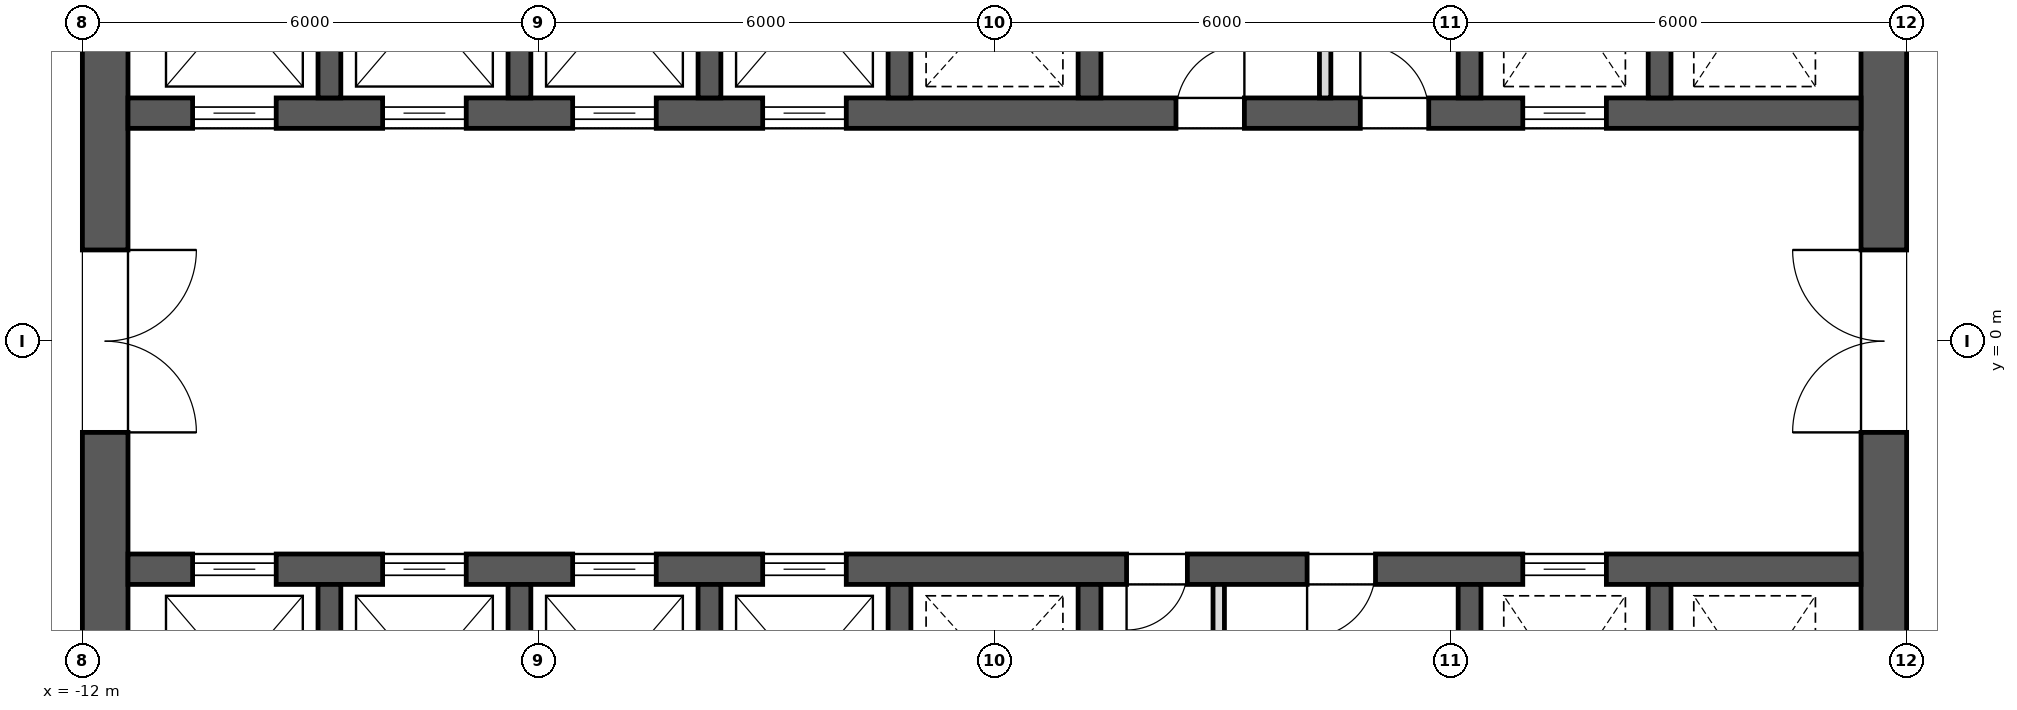
"""IFC4 building model, lengths in metres.
Left out: names, types, materials, properties, quantities, classifications, styles, units other than length and angle.
Written with IfcOpenShell. Run it as: python <this file> out.ifc"""

import sys

from ifc_helpers import new_model, si_unit, direction, frame, frame_2d, origin, place, context, subcontext, project, spatial, rectangle, extrude, element, fill, save


model = new_model("IFC4")
c1 = context("Model", 3, precision=1e-05, world=origin(), true_north=direction((0.0, 1.0)))
c2 = subcontext(c1, "Body", "Model", "MODEL_VIEW")
j1 = project(units=[si_unit("LENGTHUNIT", "METRE"), si_unit("PLANEANGLEUNIT", "RADIAN")], contexts=[c1])
p1 = place(None, origin())
s1 = spatial("IfcSite", under=j1, at=p1, CompositionType="ELEMENT")
p2 = place(p1, origin())
s2 = spatial("IfcBuilding", under=s1, at=p2, CompositionType="ELEMENT")
p3 = place(p2, frame((0.0, 0.0, 190.9)))
s3 = spatial("IfcBuildingStorey", under=s2, at=p3, CompositionType="ELEMENT", Elevation=190.9)
p4 = place(p3, frame((11.7, -11.4, 0.0), z_axis=(0.0, 0.0, 1.0), x_axis=(0.0, 1.0, 0.0)))
e1 = element("IfcWall", 1, at=p4, inside=s3, PredefinedType="SHEAR", context=c2, shape_type="SweptSolid", body=[
    extrude(rectangle(XDim=22.8, YDim=0.6, at=frame_2d((11.4, 0.0))), origin(), (0.0, 0.0, 1.0), 4.0),
])
p5 = place(p4, frame((10.2, 0.0, 0.0)))
e2 = element("IfcOpeningElement", 2, at=p5, cuts=e1, PredefinedType="OPENING", context=c2, shape_type="SweptSolid", body=[
    extrude(rectangle(XDim=2.4, YDim=2.1, at=frame_2d((1.2, 1.05))), frame((0.0, 0.312, 0.0), z_axis=(0.0, -1.0, 0.0), x_axis=(1.0, 0.0, 0.0)), (0.0, 0.0, 1.0), 0.624),
])
p6 = place(p4, frame((19.5, 0.0, 0.0)))
e3 = element("IfcOpeningElement", 3, at=p6, cuts=e1, PredefinedType="OPENING", context=c2, shape_type="SweptSolid", body=[
    extrude(rectangle(XDim=1.2, YDim=2.1, at=frame_2d((0.6, 1.05))), frame((0.0, 0.312, 0.0), z_axis=(0.0, -1.0, 0.0), x_axis=(1.0, 0.0, 0.0)), (0.0, 0.0, 1.0), 0.624),
])
p7 = place(p4, frame((2.1, 0.0, 0.0)))
e4 = element("IfcOpeningElement", 4, at=p7, cuts=e1, PredefinedType="OPENING", context=c2, shape_type="SweptSolid", body=[
    extrude(rectangle(XDim=1.2, YDim=2.1, at=frame_2d((0.6, 1.05))), frame((0.0, 0.312, 0.0), z_axis=(0.0, -1.0, 0.0), x_axis=(1.0, 0.0, 0.0)), (0.0, 0.0, 1.0), 0.624),
])
p8 = place(p3, frame((-11.7, -11.4, 0.0), z_axis=(0.0, 0.0, 1.0), x_axis=(0.0, 1.0, 0.0)))
e5 = element("IfcWall", 5, at=p8, inside=s3, PredefinedType="SHEAR", context=c2, shape_type="SweptSolid", body=[
    extrude(rectangle(XDim=22.8, YDim=0.6, at=frame_2d((11.4, 0.0))), origin(), (0.0, 0.0, 1.0), 4.0),
])
p9 = place(p8, frame((10.2, 0.0, 0.0)))
e6 = element("IfcOpeningElement", 6, at=p9, cuts=e5, PredefinedType="OPENING", context=c2, shape_type="SweptSolid", body=[
    extrude(rectangle(XDim=2.4, YDim=2.1, at=frame_2d((1.2, 1.05))), frame((0.0, 0.312, 0.0), z_axis=(0.0, -1.0, 0.0), x_axis=(1.0, 0.0, 0.0)), (0.0, 0.0, 1.0), 0.624),
])
p10 = place(p8, frame((18.925, 0.0, 0.0)))
e7 = element("IfcOpeningElement", 7, at=p10, cuts=e5, PredefinedType="OPENING", context=c2, shape_type="SweptSolid", body=[
    extrude(rectangle(XDim=1.2, YDim=2.1, at=frame_2d((0.6, 1.05))), frame((0.0, 0.312, 0.0), z_axis=(0.0, -1.0, 0.0), x_axis=(1.0, 0.0, 0.0)), (0.0, 0.0, 1.0), 0.624),
])
p11 = place(p8, frame((2.675, 0.0, 0.0)))
e8 = element("IfcOpeningElement", 8, at=p11, cuts=e5, PredefinedType="OPENING", context=c2, shape_type="SweptSolid", body=[
    extrude(rectangle(XDim=1.2, YDim=2.1, at=frame_2d((0.6, 1.05))), frame((0.0, 0.312, 0.0), z_axis=(0.0, -1.0, 0.0), x_axis=(1.0, 0.0, 0.0)), (0.0, 0.0, 1.0), 0.624),
])
p12 = place(p3, frame((-11.4, 3.0, 0.0), z_axis=(0.0, 0.0, 1.0), x_axis=(1.0, 0.0, 0.0)))
e9 = element("IfcWall", 9, at=p12, inside=s3, PredefinedType="SHEAR", context=c2, shape_type="SweptSolid", body=[
    extrude(rectangle(XDim=22.8, YDim=0.4, at=frame_2d((11.4, 0.0))), origin(), (0.0, 0.0, 1.0), 4.0),
])
p13 = place(p12, frame((0.85, 0.0, 0.0)))
e10 = element("IfcOpeningElement", 10, at=p13, cuts=e9, PredefinedType="OPENING", context=c2, shape_type="SweptSolid", body=[
    extrude(rectangle(XDim=1.1, YDim=2.1, at=frame_2d((0.55, 1.05))), frame((0.0, 0.212, 0.0), z_axis=(0.0, -1.0, 0.0), x_axis=(1.0, 0.0, 0.0)), (0.0, 0.0, 1.0), 0.424),
])
p14 = place(p12, frame((3.35, 0.0, 0.0)))
e11 = element("IfcOpeningElement", 11, at=p14, cuts=e9, PredefinedType="OPENING", context=c2, shape_type="SweptSolid", body=[
    extrude(rectangle(XDim=1.1, YDim=2.1, at=frame_2d((0.55, 1.05))), frame((0.0, 0.212, 0.0), z_axis=(0.0, -1.0, 0.0), x_axis=(1.0, 0.0, 0.0)), (0.0, 0.0, 1.0), 0.424),
])
p15 = place(p12, frame((5.85, 0.0, 0.0)))
e12 = element("IfcOpeningElement", 12, at=p15, cuts=e9, PredefinedType="OPENING", context=c2, shape_type="SweptSolid", body=[
    extrude(rectangle(XDim=1.1, YDim=2.1, at=frame_2d((0.55, 1.05))), frame((0.0, 0.212, 0.0), z_axis=(0.0, -1.0, 0.0), x_axis=(1.0, 0.0, 0.0)), (0.0, 0.0, 1.0), 0.424),
])
p16 = place(p12, frame((8.35, 0.0, 0.0)))
e13 = element("IfcOpeningElement", 13, at=p16, cuts=e9, PredefinedType="OPENING", context=c2, shape_type="SweptSolid", body=[
    extrude(rectangle(XDim=1.1, YDim=2.1, at=frame_2d((0.55, 1.05))), frame((0.0, 0.212, 0.0), z_axis=(0.0, -1.0, 0.0), x_axis=(1.0, 0.0, 0.0)), (0.0, 0.0, 1.0), 0.424),
])
p17 = place(p12, frame((18.35, 0.0, 0.0)))
e14 = element("IfcOpeningElement", 14, at=p17, cuts=e9, PredefinedType="OPENING", context=c2, shape_type="SweptSolid", body=[
    extrude(rectangle(XDim=1.1, YDim=2.1, at=frame_2d((0.55, 1.05))), frame((0.0, 0.212, 0.0), z_axis=(0.0, -1.0, 0.0), x_axis=(1.0, 0.0, 0.0)), (0.0, 0.0, 1.0), 0.424),
])
p18 = place(p12, frame((13.788, 0.0, 0.0)))
e15 = element("IfcOpeningElement", 15, at=p18, cuts=e9, PredefinedType="OPENING", context=c2, shape_type="SweptSolid", body=[
    extrude(rectangle(XDim=0.9, YDim=2.1, at=frame_2d((0.45, 1.05))), frame((0.0, 0.212, 0.0), z_axis=(0.0, -1.0, 0.0), x_axis=(1.0, 0.0, 0.0)), (0.0, 0.0, 1.0), 0.424),
])
p19 = place(p12, frame((16.212, 0.0, 0.0)))
e16 = element("IfcOpeningElement", 16, at=p19, cuts=e9, PredefinedType="OPENING", context=c2, shape_type="SweptSolid", body=[
    extrude(rectangle(XDim=0.9, YDim=2.1, at=frame_2d((0.45, 1.05))), frame((0.0, 0.212, 0.0), z_axis=(0.0, -1.0, 0.0), x_axis=(1.0, 0.0, 0.0)), (0.0, 0.0, 1.0), 0.424),
])
for number, where, z_axis, x_axis in (
    (17, (-8.75, 3.2, 0.0), (0.0, 0.0, 1.0), (0.0, 1.0, 0.0)),
    (18, (-6.25, 3.2, 0.0), (0.0, 0.0, 1.0), (0.0, 1.0, 0.0)),
    (19, (-3.75, 3.2, 0.0), (0.0, 0.0, 1.0), (0.0, 1.0, 0.0)),
    (20, (-1.25, 3.2, 0.0), (0.0, 0.0, 1.0), (0.0, 1.0, 0.0)),
    (21, (1.25, 3.2, 0.0), (0.0, 0.0, 1.0), (0.0, 1.0, 0.0)),
    (22, (6.25, 3.2, 0.0), (0.0, 0.0, 1.0), (0.0, 1.0, 0.0)),
    (23, (8.75, 3.2, 0.0), (0.0, 0.0, 1.0), (0.0, 1.0, 0.0)),
):
    element("IfcWall", number, at=place(p3, frame(where, z_axis=z_axis, x_axis=x_axis)), inside=s3, PredefinedType="SHEAR", context=c2, shape_type="SweptSolid", body=[
        extrude(rectangle(XDim=2.9, YDim=0.3, at=frame_2d((1.45, 0.0))), origin(), (0.0, 0.0, 1.0), 4.0),
    ])
p20 = place(p3, frame((-11.4, -3.0, 0.0), z_axis=(0.0, 0.0, 1.0), x_axis=(1.0, 0.0, 0.0)))
e24 = element("IfcWall", 24, at=p20, inside=s3, PredefinedType="SHEAR", context=c2, shape_type="SweptSolid", body=[
    extrude(rectangle(XDim=22.8, YDim=0.4, at=frame_2d((11.4, 0.0))), origin(), (0.0, 0.0, 1.0), 4.0),
])
p21 = place(p20, frame((0.85, 0.0, 0.0)))
e25 = element("IfcOpeningElement", 25, at=p21, cuts=e24, PredefinedType="OPENING", context=c2, shape_type="SweptSolid", body=[
    extrude(rectangle(XDim=1.1, YDim=2.1, at=frame_2d((0.55, 1.05))), frame((0.0, 0.212, 0.0), z_axis=(0.0, -1.0, 0.0), x_axis=(1.0, 0.0, 0.0)), (0.0, 0.0, 1.0), 0.424),
])
p22 = place(p20, frame((3.35, 0.0, 0.0)))
e26 = element("IfcOpeningElement", 26, at=p22, cuts=e24, PredefinedType="OPENING", context=c2, shape_type="SweptSolid", body=[
    extrude(rectangle(XDim=1.1, YDim=2.1, at=frame_2d((0.55, 1.05))), frame((0.0, 0.212, 0.0), z_axis=(0.0, -1.0, 0.0), x_axis=(1.0, 0.0, 0.0)), (0.0, 0.0, 1.0), 0.424),
])
p23 = place(p20, frame((5.85, 0.0, 0.0)))
e27 = element("IfcOpeningElement", 27, at=p23, cuts=e24, PredefinedType="OPENING", context=c2, shape_type="SweptSolid", body=[
    extrude(rectangle(XDim=1.1, YDim=2.1, at=frame_2d((0.55, 1.05))), frame((0.0, 0.212, 0.0), z_axis=(0.0, -1.0, 0.0), x_axis=(1.0, 0.0, 0.0)), (0.0, 0.0, 1.0), 0.424),
])
p24 = place(p20, frame((8.35, 0.0, 0.0)))
e28 = element("IfcOpeningElement", 28, at=p24, cuts=e24, PredefinedType="OPENING", context=c2, shape_type="SweptSolid", body=[
    extrude(rectangle(XDim=1.1, YDim=2.1, at=frame_2d((0.55, 1.05))), frame((0.0, 0.212, 0.0), z_axis=(0.0, -1.0, 0.0), x_axis=(1.0, 0.0, 0.0)), (0.0, 0.0, 1.0), 0.424),
])
p25 = place(p20, frame((18.35, 0.0, 0.0)))
e29 = element("IfcOpeningElement", 29, at=p25, cuts=e24, PredefinedType="OPENING", context=c2, shape_type="SweptSolid", body=[
    extrude(rectangle(XDim=1.1, YDim=2.1, at=frame_2d((0.55, 1.05))), frame((0.0, 0.212, 0.0), z_axis=(0.0, -1.0, 0.0), x_axis=(1.0, 0.0, 0.0)), (0.0, 0.0, 1.0), 0.424),
])
p26 = place(p20, frame((13.137, 0.0, 0.0)))
e30 = element("IfcOpeningElement", 30, at=p26, cuts=e24, PredefinedType="OPENING", context=c2, shape_type="SweptSolid", body=[
    extrude(rectangle(XDim=0.8, YDim=2.1, at=frame_2d((0.4, 1.05))), frame((0.0, 0.212, 0.0), z_axis=(0.0, -1.0, 0.0), x_axis=(1.0, 0.0, 0.0)), (0.0, 0.0, 1.0), 0.424),
])
p27 = place(p20, frame((15.512, 0.0, 0.0)))
e31 = element("IfcOpeningElement", 31, at=p27, cuts=e24, PredefinedType="OPENING", context=c2, shape_type="SweptSolid", body=[
    extrude(rectangle(XDim=0.9, YDim=2.1, at=frame_2d((0.45, 1.05))), frame((0.0, 0.212, 0.0), z_axis=(0.0, -1.0, 0.0), x_axis=(1.0, 0.0, 0.0)), (0.0, 0.0, 1.0), 0.424),
])
for number, where, z_axis, x_axis in (
    (32, (-8.75, -6.1, 0.0), (0.0, 0.0, 1.0), (0.0, 1.0, 0.0)),
    (33, (-6.25, -6.1, 0.0), (0.0, 0.0, 1.0), (0.0, 1.0, 0.0)),
    (34, (-3.75, -6.1, 0.0), (0.0, 0.0, 1.0), (0.0, 1.0, 0.0)),
    (35, (-1.25, -6.1, 0.0), (0.0, 0.0, 1.0), (0.0, 1.0, 0.0)),
    (36, (1.25, -6.1, 0.0), (0.0, 0.0, 1.0), (0.0, 1.0, 0.0)),
    (37, (6.25, -6.1, 0.0), (0.0, 0.0, 1.0), (0.0, 1.0, 0.0)),
    (38, (8.75, -6.1, 0.0), (0.0, 0.0, 1.0), (0.0, 1.0, 0.0)),
):
    element("IfcWall", number, at=place(p3, frame(where, z_axis=z_axis, x_axis=x_axis)), inside=s3, PredefinedType="SHEAR", context=c2, shape_type="SweptSolid", body=[
        extrude(rectangle(XDim=2.9, YDim=0.3, at=frame_2d((1.45, 0.0))), origin(), (0.0, 0.0, 1.0), 4.0),
    ])
for number, where, z_axis, x_axis in (
    (39, (4.35, 3.2, 0.0), (0.0, 0.0, 1.0), (0.0, 1.0, 0.0)),
    (40, (2.95, -6.1, 0.0), (0.0, 0.0, 1.0), (0.0, 1.0, 0.0)),
):
    element("IfcWall", number, at=place(p3, frame(where, z_axis=z_axis, x_axis=x_axis)), inside=s3, PredefinedType="PARTITIONING", context=c2, shape_type="SweptSolid", body=[
        extrude(rectangle(XDim=2.9, YDim=0.15, at=frame_2d((1.45, 0.0))), origin(), (0.0, 0.0, 1.0), 3.7),
    ])
p28 = place(p13, origin())
e41 = element("IfcDoor", 41, at=p28, inside=s3, OperationType="SLIDING_TO_LEFT", PredefinedType="DOOR", context=c2, shape_type="SweptSolid", body=[
    extrude(rectangle(XDim=1.1, YDim=2.1, at=frame_2d((0.55, 1.05))), frame((0.0, 0.025, 0.0), z_axis=(0.0, -1.0, 0.0), x_axis=(1.0, 0.0, 0.0)), (0.0, 0.0, 1.0), 0.05),
])
fill(e10, e41)
p29 = place(p14, origin())
e42 = element("IfcDoor", 42, at=p29, inside=s3, OperationType="SLIDING_TO_LEFT", PredefinedType="DOOR", context=c2, shape_type="SweptSolid", body=[
    extrude(rectangle(XDim=1.1, YDim=2.1, at=frame_2d((0.55, 1.05))), frame((0.0, 0.025, 0.0), z_axis=(0.0, -1.0, 0.0), x_axis=(1.0, 0.0, 0.0)), (0.0, 0.0, 1.0), 0.05),
])
fill(e11, e42)
p30 = place(p21, origin())
e43 = element("IfcDoor", 43, at=p30, inside=s3, OperationType="SLIDING_TO_LEFT", PredefinedType="DOOR", context=c2, shape_type="SweptSolid", body=[
    extrude(rectangle(XDim=1.1, YDim=2.1, at=frame_2d((0.55, 1.05))), frame((0.0, 0.025, 0.0), z_axis=(0.0, -1.0, 0.0), x_axis=(1.0, 0.0, 0.0)), (0.0, 0.0, 1.0), 0.05),
])
fill(e25, e43)
p31 = place(p22, origin())
e44 = element("IfcDoor", 44, at=p31, inside=s3, OperationType="SLIDING_TO_LEFT", PredefinedType="DOOR", context=c2, shape_type="SweptSolid", body=[
    extrude(rectangle(XDim=1.1, YDim=2.1, at=frame_2d((0.55, 1.05))), frame((0.0, 0.025, 0.0), z_axis=(0.0, -1.0, 0.0), x_axis=(1.0, 0.0, 0.0)), (0.0, 0.0, 1.0), 0.05),
])
fill(e26, e44)
p32 = place(p15, origin())
e45 = element("IfcDoor", 45, at=p32, inside=s3, OperationType="SLIDING_TO_LEFT", PredefinedType="DOOR", context=c2, shape_type="SweptSolid", body=[
    extrude(rectangle(XDim=1.1, YDim=2.1, at=frame_2d((0.55, 1.05))), frame((0.0, 0.025, 0.0), z_axis=(0.0, -1.0, 0.0), x_axis=(1.0, 0.0, 0.0)), (0.0, 0.0, 1.0), 0.05),
])
fill(e12, e45)
p33 = place(p16, origin())
e46 = element("IfcDoor", 46, at=p33, inside=s3, OperationType="SLIDING_TO_LEFT", PredefinedType="DOOR", context=c2, shape_type="SweptSolid", body=[
    extrude(rectangle(XDim=1.1, YDim=2.1, at=frame_2d((0.55, 1.05))), frame((0.0, 0.025, 0.0), z_axis=(0.0, -1.0, 0.0), x_axis=(1.0, 0.0, 0.0)), (0.0, 0.0, 1.0), 0.05),
])
fill(e13, e46)
p34 = place(p23, origin())
e47 = element("IfcDoor", 47, at=p34, inside=s3, OperationType="SLIDING_TO_LEFT", PredefinedType="DOOR", context=c2, shape_type="SweptSolid", body=[
    extrude(rectangle(XDim=1.1, YDim=2.1, at=frame_2d((0.55, 1.05))), frame((0.0, 0.025, 0.0), z_axis=(0.0, -1.0, 0.0), x_axis=(1.0, 0.0, 0.0)), (0.0, 0.0, 1.0), 0.05),
])
fill(e27, e47)
p35 = place(p24, origin())
e48 = element("IfcDoor", 48, at=p35, inside=s3, OperationType="SLIDING_TO_LEFT", PredefinedType="DOOR", context=c2, shape_type="SweptSolid", body=[
    extrude(rectangle(XDim=1.1, YDim=2.1, at=frame_2d((0.55, 1.05))), frame((0.0, 0.025, 0.0), z_axis=(0.0, -1.0, 0.0), x_axis=(1.0, 0.0, 0.0)), (0.0, 0.0, 1.0), 0.05),
])
fill(e28, e48)
p36 = place(p17, origin())
e49 = element("IfcDoor", 49, at=p36, inside=s3, OperationType="SLIDING_TO_LEFT", PredefinedType="DOOR", context=c2, shape_type="SweptSolid", body=[
    extrude(rectangle(XDim=1.1, YDim=2.1, at=frame_2d((0.55, 1.05))), frame((0.0, 0.025, 0.0), z_axis=(0.0, -1.0, 0.0), x_axis=(1.0, 0.0, 0.0)), (0.0, 0.0, 1.0), 0.05),
])
fill(e14, e49)
p37 = place(p25, origin())
e50 = element("IfcDoor", 50, at=p37, inside=s3, OperationType="SLIDING_TO_LEFT", PredefinedType="DOOR", context=c2, shape_type="SweptSolid", body=[
    extrude(rectangle(XDim=1.1, YDim=2.1, at=frame_2d((0.55, 1.05))), frame((0.0, 0.025, 0.0), z_axis=(0.0, -1.0, 0.0), x_axis=(1.0, 0.0, 0.0)), (0.0, 0.0, 1.0), 0.05),
])
fill(e29, e50)
p38 = place(p9, frame((2.4, 0.0, 0.0), z_axis=(0.0, 0.0, 1.0), x_axis=(-1.0, 0.0, 0.0)))
e51 = element("IfcDoor", 51, at=p38, inside=s3, OperationType="DOUBLE_DOOR_SINGLE_SWING", PredefinedType="DOOR", context=c2, shape_type="SweptSolid", body=[
    extrude(rectangle(XDim=2.4, YDim=2.1, at=frame_2d((1.2, 1.05))), frame((0.0, 0.025, 0.0), z_axis=(0.0, -1.0, 0.0), x_axis=(1.0, 0.0, 0.0)), (0.0, 0.0, 1.0), 0.05),
])
fill(e6, e51)
p39 = place(p5, origin())
e52 = element("IfcDoor", 52, at=p39, inside=s3, OperationType="DOUBLE_DOOR_SINGLE_SWING", PredefinedType="DOOR", context=c2, shape_type="SweptSolid", body=[
    extrude(rectangle(XDim=2.4, YDim=2.1, at=frame_2d((1.2, 1.05))), frame((0.0, 0.025, 0.0), z_axis=(0.0, -1.0, 0.0), x_axis=(1.0, 0.0, 0.0)), (0.0, 0.0, 1.0), 0.05),
])
fill(e2, e52)
p40 = place(p18, origin())
e53 = element("IfcDoor", 53, at=p40, inside=s3, OperationType="SINGLE_SWING_LEFT", PredefinedType="DOOR", context=c2, shape_type="SweptSolid", body=[
    extrude(rectangle(XDim=0.9, YDim=2.1, at=frame_2d((0.45, 1.05))), frame((0.0, 0.025, 0.0), z_axis=(0.0, -1.0, 0.0), x_axis=(1.0, 0.0, 0.0)), (0.0, 0.0, 1.0), 0.05),
])
fill(e15, e53)
p41 = place(p19, origin())
e54 = element("IfcDoor", 54, at=p41, inside=s3, OperationType="SINGLE_SWING_RIGHT", PredefinedType="DOOR", context=c2, shape_type="SweptSolid", body=[
    extrude(rectangle(XDim=0.9, YDim=2.1, at=frame_2d((0.45, 1.05))), frame((0.0, 0.025, 0.0), z_axis=(0.0, -1.0, 0.0), x_axis=(1.0, 0.0, 0.0)), (0.0, 0.0, 1.0), 0.05),
])
fill(e16, e54)
p42 = place(p26, frame((0.8, 0.0, 0.0), z_axis=(0.0, 0.0, 1.0), x_axis=(-1.0, 0.0, 0.0)))
e55 = element("IfcDoor", 55, at=p42, inside=s3, OperationType="SINGLE_SWING_LEFT", PredefinedType="DOOR", context=c2, shape_type="SweptSolid", body=[
    extrude(rectangle(XDim=0.8, YDim=2.1, at=frame_2d((0.4, 1.05))), frame((0.0, 0.025, 0.0), z_axis=(0.0, -1.0, 0.0), x_axis=(1.0, 0.0, 0.0)), (0.0, 0.0, 1.0), 0.05),
])
fill(e30, e55)
p43 = place(p27, frame((0.9, 0.0, 0.0), z_axis=(0.0, 0.0, 1.0), x_axis=(-1.0, 0.0, 0.0)))
e56 = element("IfcDoor", 56, at=p43, inside=s3, OperationType="SINGLE_SWING_LEFT", PredefinedType="DOOR", context=c2, shape_type="SweptSolid", body=[
    extrude(rectangle(XDim=0.9, YDim=2.1, at=frame_2d((0.45, 1.05))), frame((0.0, 0.025, 0.0), z_axis=(0.0, -1.0, 0.0), x_axis=(1.0, 0.0, 0.0)), (0.0, 0.0, 1.0), 0.05),
])
fill(e31, e56)
save(model, sys.argv[1])
